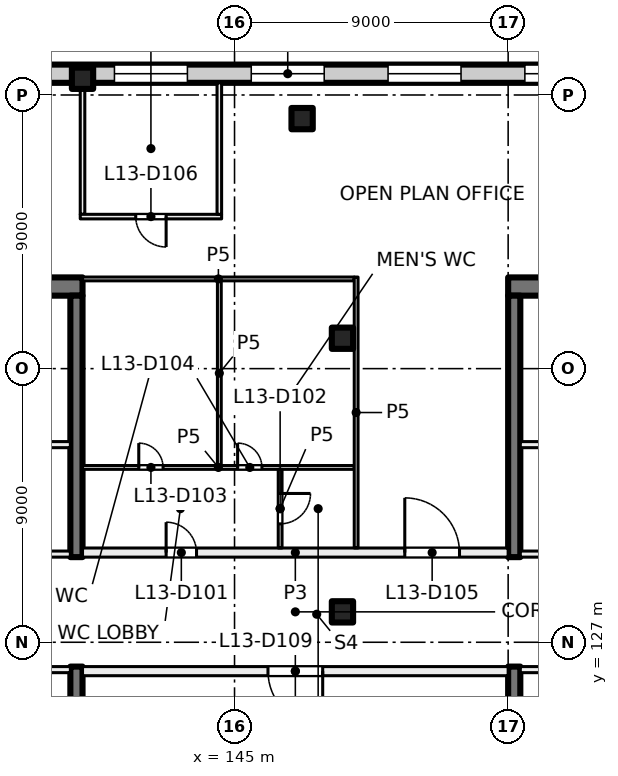
"""IFC4 building model, lengths in metres.
Left out: names, types, materials, properties, quantities, classifications, styles, units other than length and angle.
Written with IfcOpenShell. Run it as: python <this file> out.ifc"""

import sys

from ifc_helpers import new_model, si_unit, direction, frame, frame_2d, origin, origin_2d, place, context, subcontext, project, spatial, rectangle, extrude, element, fill, save


model = new_model("IFC4")
c1 = context("Model", 3, precision=1e-05, world=origin(), true_north=direction((0.0, 1.0)))
c2 = subcontext(c1, "Body", "Model", "MODEL_VIEW")
j1 = project(units=[si_unit("LENGTHUNIT", "METRE"), si_unit("PLANEANGLEUNIT", "RADIAN")], contexts=[c1])
p1 = place(None, origin())
s1 = spatial("IfcSite", under=j1, at=p1, CompositionType="ELEMENT")
p2 = place(p1, origin())
s2 = spatial("IfcBuilding", under=s1, at=p2, CompositionType="ELEMENT")
p3 = place(p2, frame((0.0, 0.0, 59.5)))
s3 = spatial("IfcBuildingStorey", under=s2, at=p3, CompositionType="ELEMENT", Elevation=59.5)
for number, where, z_axis, x_axis in (
    (1, (148.55, 128.0, 0.0), (0.0, 0.0, 1.0), (1.0, 0.0, 0.0)),
    (2, (148.55, 137.0, 0.0), (0.0, 0.0, 1.0), (1.0, 0.0, 0.0)),
    (3, (140.0, 145.55, 0.0), (0.0, 0.0, 1.0), (1.0, 0.0, 0.0)),
    (4, (147.223, 144.223, 0.0), (0.0, 0.0, 1.0), (1.0, 0.0, 0.0)),
):
    element("IfcColumn", number, at=place(p3, frame(where, z_axis=z_axis, x_axis=x_axis)), inside=s3, PredefinedType="COLUMN", context=c2, shape_type="SweptSolid", body=[
        extrude(rectangle(XDim=0.7, YDim=0.7, at=origin_2d()), origin(), (0.0, 0.0, 1.0), 4.0),
    ])
p4 = place(p3, frame((135.4, 138.7, 0.0), z_axis=(0.0, 0.0, 1.0), x_axis=(1.0, 0.0, 0.0)))
e5 = element("IfcWall", 5, at=p4, inside=s3, PredefinedType="SHEAR", context=c2, shape_type="SweptSolid", body=[
    extrude(rectangle(XDim=4.6, YDim=0.6, at=frame_2d((2.3, 0.0))), origin(), (0.0, 0.0, 1.0), 4.0),
])
for number, where, z_axis, x_axis in (
    (6, (139.8, 117.6, 0.0), (0.0, 0.0, 1.0), (0.0, 1.0, 0.0)),
    (7, (139.8, 129.8, 0.0), (0.0, 0.0, 1.0), (0.0, 1.0, 0.0)),
):
    element("IfcWall", number, at=place(p3, frame(where, z_axis=z_axis, x_axis=x_axis)), inside=s3, PredefinedType="SHEAR", context=c2, shape_type="SweptSolid", body=[
        extrude(rectangle(XDim=8.6, YDim=0.4, at=frame_2d((4.3, 0.0))), origin(), (0.0, 0.0, 1.0), 4.0),
    ])
p5 = place(p3, frame((158.6, 138.7, 0.0), z_axis=(0.0, 0.0, 1.0), x_axis=(-1.0, 0.0, 0.0)))
e8 = element("IfcWall", 8, at=p5, inside=s3, PredefinedType="SHEAR", context=c2, shape_type="SweptSolid", body=[
    extrude(rectangle(XDim=4.6, YDim=0.6, at=frame_2d((2.3, 0.0))), origin(), (0.0, 0.0, 1.0), 4.0),
])
for number, where, z_axis, x_axis in (
    (9, (154.2, 138.4, 0.0), (0.0, 0.0, 1.0), (0.0, -1.0, 0.0)),
    (10, (154.2, 126.2, 0.0), (0.0, 0.0, 1.0), (0.0, -1.0, 0.0)),
):
    element("IfcWall", number, at=place(p3, frame(where, z_axis=z_axis, x_axis=x_axis)), inside=s3, PredefinedType="SHEAR", context=c2, shape_type="SweptSolid", body=[
        extrude(rectangle(XDim=8.6, YDim=0.4, at=frame_2d((4.3, 0.0))), origin(), (0.0, 0.0, 1.0), 4.0),
    ])
p6 = place(p3, frame((131.07, 145.7, 0.0), z_axis=(0.0, 0.0, 1.0), x_axis=(1.0, 0.0, 0.0)))
e11 = element("IfcWall", 11, at=p6, inside=s3, PredefinedType="SOLIDWALL", context=c2, shape_type="SweptSolid", body=[
    extrude(rectangle(XDim=31.93, YDim=0.6, at=frame_2d((15.965, 0.0))), origin(), (0.0, 0.0, 1.0), 3.625),
])
p7 = place(p6, frame((0.98, 0.0, 0.9)))
e12 = element("IfcOpeningElement", 12, at=p7, cuts=e11, PredefinedType="OPENING", context=c2, shape_type="SweptSolid", body=[
    extrude(rectangle(XDim=2.4, YDim=2.4, at=frame_2d((1.2, 1.2))), frame((0.0, 0.31, 0.0), z_axis=(0.0, -1.0, 0.0), x_axis=(1.0, 0.0, 0.0)), (0.0, 0.0, 1.0), 0.62),
])
p8 = place(p6, frame((5.48, 0.0, 0.9)))
e13 = element("IfcOpeningElement", 13, at=p8, cuts=e11, PredefinedType="OPENING", context=c2, shape_type="SweptSolid", body=[
    extrude(rectangle(XDim=2.4, YDim=2.4, at=frame_2d((1.2, 1.2))), frame((0.0, 0.31, 0.0), z_axis=(0.0, -1.0, 0.0), x_axis=(1.0, 0.0, 0.0)), (0.0, 0.0, 1.0), 0.62),
])
p9 = place(p6, frame((9.98, 0.0, 0.9)))
e14 = element("IfcOpeningElement", 14, at=p9, cuts=e11, PredefinedType="OPENING", context=c2, shape_type="SweptSolid", body=[
    extrude(rectangle(XDim=2.4, YDim=2.4, at=frame_2d((1.2, 1.2))), frame((0.0, 0.31, 0.0), z_axis=(0.0, -1.0, 0.0), x_axis=(1.0, 0.0, 0.0)), (0.0, 0.0, 1.0), 0.62),
])
p10 = place(p6, frame((14.48, 0.0, 0.9)))
e15 = element("IfcOpeningElement", 15, at=p10, cuts=e11, PredefinedType="OPENING", context=c2, shape_type="SweptSolid", body=[
    extrude(rectangle(XDim=2.4, YDim=2.4, at=frame_2d((1.2, 1.2))), frame((0.0, 0.31, 0.0), z_axis=(0.0, -1.0, 0.0), x_axis=(1.0, 0.0, 0.0)), (0.0, 0.0, 1.0), 0.62),
])
p11 = place(p6, frame((18.98, 0.0, 0.9)))
e16 = element("IfcOpeningElement", 16, at=p11, cuts=e11, PredefinedType="OPENING", context=c2, shape_type="SweptSolid", body=[
    extrude(rectangle(XDim=2.4, YDim=2.4, at=frame_2d((1.2, 1.2))), frame((0.0, 0.31, 0.0), z_axis=(0.0, -1.0, 0.0), x_axis=(1.0, 0.0, 0.0)), (0.0, 0.0, 1.0), 0.62),
])
p12 = place(p6, frame((23.48, 0.0, 0.9)))
e17 = element("IfcOpeningElement", 17, at=p12, cuts=e11, PredefinedType="OPENING", context=c2, shape_type="SweptSolid", body=[
    extrude(rectangle(XDim=2.4, YDim=2.4, at=frame_2d((1.2, 1.2))), frame((0.0, 0.31, 0.0), z_axis=(0.0, -1.0, 0.0), x_axis=(1.0, 0.0, 0.0)), (0.0, 0.0, 1.0), 0.62),
])
p13 = place(p6, frame((27.98, 0.0, 0.9)))
e18 = element("IfcOpeningElement", 18, at=p13, cuts=e11, PredefinedType="OPENING", context=c2, shape_type="SweptSolid", body=[
    extrude(rectangle(XDim=2.4, YDim=2.4, at=frame_2d((1.2, 1.2))), frame((0.0, 0.31, 0.0), z_axis=(0.0, -1.0, 0.0), x_axis=(1.0, 0.0, 0.0)), (0.0, 0.0, 1.0), 0.62),
])
p14 = place(p3, frame((135.0, 129.9, 0.0), z_axis=(0.0, 0.0, 1.0), x_axis=(1.0, 0.0, 0.0)))
e19 = element("IfcWall", 19, at=p14, inside=s3, PredefinedType="PARTITIONING", context=c2, shape_type="SweptSolid", body=[
    extrude(rectangle(XDim=4.6, YDim=0.2, at=frame_2d((2.3, 0.0))), origin(), (0.0, 0.0, 1.0), 3.625),
])
p15 = place(p14, frame((1.7, 0.0, 0.0)))
e20 = element("IfcOpeningElement", 20, at=p15, cuts=e19, PredefinedType="OPENING", context=c2, shape_type="SweptSolid", body=[
    extrude(rectangle(XDim=1.2, YDim=2.1, at=frame_2d((0.6, 1.05))), frame((0.0, 0.11, 0.0), z_axis=(0.0, -1.0, 0.0), x_axis=(1.0, 0.0, 0.0)), (0.0, 0.0, 1.0), 0.22),
])
p16 = place(p3, frame((135.0, 133.5, 0.0), z_axis=(0.0, 0.0, 1.0), x_axis=(1.0, 0.0, 0.0)))
e21 = element("IfcWall", 21, at=p16, inside=s3, PredefinedType="PARTITIONING", context=c2, shape_type="SweptSolid", body=[
    extrude(rectangle(XDim=4.6, YDim=0.2, at=frame_2d((2.3, 0.0))), origin(), (0.0, 0.0, 1.0), 3.625),
])
p17 = place(p16, frame((1.75, 0.0, 0.0)))
e22 = element("IfcOpeningElement", 22, at=p17, cuts=e21, PredefinedType="OPENING", context=c2, shape_type="SweptSolid", body=[
    extrude(rectangle(XDim=1.5, YDim=2.1, at=frame_2d((0.75, 1.05))), frame((0.0, 0.11, 0.0), z_axis=(0.0, -1.0, 0.0), x_axis=(1.0, 0.0, 0.0)), (0.0, 0.0, 1.0), 0.22),
])
p18 = place(p3, frame((139.6, 126.1, 0.0), z_axis=(0.0, 0.0, 1.0), x_axis=(-1.0, 0.0, 0.0)))
e23 = element("IfcWall", 23, at=p18, inside=s3, PredefinedType="PARTITIONING", context=c2, shape_type="SweptSolid", body=[
    extrude(rectangle(XDim=4.6, YDim=0.2, at=frame_2d((2.3, 0.0))), origin(), (0.0, 0.0, 1.0), 3.625),
])
p19 = place(p18, frame((1.7, 0.0, 0.0)))
e24 = element("IfcOpeningElement", 24, at=p19, cuts=e23, PredefinedType="OPENING", context=c2, shape_type="SweptSolid", body=[
    extrude(rectangle(XDim=1.2, YDim=2.1, at=frame_2d((0.6, 1.05))), frame((0.0, 0.11, 0.0), z_axis=(0.0, -1.0, 0.0), x_axis=(1.0, 0.0, 0.0)), (0.0, 0.0, 1.0), 0.22),
])
p20 = place(p3, frame((163.8, 126.1, 0.0), z_axis=(0.0, 0.0, 1.0), x_axis=(-1.0, 0.0, 0.0)))
e25 = element("IfcWall", 25, at=p20, inside=s3, PredefinedType="PARTITIONING", context=c2, shape_type="SweptSolid", body=[
    extrude(rectangle(XDim=9.4, YDim=0.2, at=frame_2d((4.7, 0.0))), origin(), (0.0, 0.0, 1.0), 3.625),
])
p21 = place(p20, frame((4.1, 0.0, 0.0)))
e26 = element("IfcOpeningElement", 26, at=p21, cuts=e25, PredefinedType="OPENING", context=c2, shape_type="SweptSolid", body=[
    extrude(rectangle(XDim=1.2, YDim=2.1, at=frame_2d((0.6, 1.05))), frame((0.0, 0.11, 0.0), z_axis=(0.0, -1.0, 0.0), x_axis=(1.0, 0.0, 0.0)), (0.0, 0.0, 1.0), 0.22),
])
p22 = place(p3, frame((154.4, 129.9, 0.0), z_axis=(0.0, 0.0, 1.0), x_axis=(1.0, 0.0, 0.0)))
e27 = element("IfcWall", 27, at=p22, inside=s3, PredefinedType="PARTITIONING", context=c2, shape_type="SweptSolid", body=[
    extrude(rectangle(XDim=9.4, YDim=0.2, at=frame_2d((4.7, 0.0))), origin(), (0.0, 0.0, 1.0), 3.625),
])
p23 = place(p22, frame((4.1, 0.0, 0.0)))
e28 = element("IfcOpeningElement", 28, at=p23, cuts=e27, PredefinedType="OPENING", context=c2, shape_type="SweptSolid", body=[
    extrude(rectangle(XDim=1.2, YDim=2.1, at=frame_2d((0.6, 1.05))), frame((0.0, 0.11, 0.0), z_axis=(0.0, -1.0, 0.0), x_axis=(1.0, 0.0, 0.0)), (0.0, 0.0, 1.0), 0.22),
])
p24 = place(p3, frame((154.4, 133.5, 0.0), z_axis=(0.0, 0.0, 1.0), x_axis=(1.0, 0.0, 0.0)))
e29 = element("IfcWall", 29, at=p24, inside=s3, PredefinedType="PARTITIONING", context=c2, shape_type="SweptSolid", body=[
    extrude(rectangle(XDim=9.4, YDim=0.2, at=frame_2d((4.7, 0.0))), origin(), (0.0, 0.0, 1.0), 3.625),
])
p25 = place(p24, frame((1.35, 0.0, 0.0)))
e30 = element("IfcOpeningElement", 30, at=p25, cuts=e29, PredefinedType="OPENING", context=c2, shape_type="SweptSolid", body=[
    extrude(rectangle(XDim=1.5, YDim=2.1, at=frame_2d((0.75, 1.05))), frame((0.0, 0.11, 0.0), z_axis=(0.0, -1.0, 0.0), x_axis=(1.0, 0.0, 0.0)), (0.0, 0.0, 1.0), 0.22),
])
p26 = place(p3, frame((140.0, 129.95, 0.0), z_axis=(0.0, 0.0, 1.0), x_axis=(1.0, 0.0, 0.0)))
e31 = element("IfcWall", 31, at=p26, inside=s3, PredefinedType="PARTITIONING", context=c2, shape_type="SweptSolid", body=[
    extrude(rectangle(XDim=14.0, YDim=0.3, at=frame_2d((7.0, 0.0))), origin(), (0.0, 0.0, 1.0), 3.625),
])
p27 = place(p26, frame((2.75, 0.0, 0.0)))
e32 = element("IfcOpeningElement", 32, at=p27, cuts=e31, PredefinedType="OPENING", context=c2, shape_type="SweptSolid", body=[
    extrude(rectangle(XDim=1.0, YDim=2.1, at=frame_2d((0.5, 1.05))), frame((0.0, 0.16, 0.0), z_axis=(0.0, -1.0, 0.0), x_axis=(1.0, 0.0, 0.0)), (0.0, 0.0, 1.0), 0.32),
])
p28 = place(p26, frame((10.6, 0.0, 0.0)))
e33 = element("IfcOpeningElement", 33, at=p28, cuts=e31, PredefinedType="OPENING", context=c2, shape_type="SweptSolid", body=[
    extrude(rectangle(XDim=1.8, YDim=2.1, at=frame_2d((0.9, 1.05))), frame((0.0, 0.16, 0.0), z_axis=(0.0, -1.0, 0.0), x_axis=(1.0, 0.0, 0.0)), (0.0, 0.0, 1.0), 0.32),
])
p29 = place(p3, frame((140.0, 132.75, 0.0), z_axis=(0.0, 0.0, 1.0), x_axis=(1.0, 0.0, 0.0)))
e34 = element("IfcWall", 34, at=p29, inside=s3, PredefinedType="PARTITIONING", context=c2, shape_type="SweptSolid", body=[
    extrude(rectangle(XDim=8.938, YDim=0.125, at=frame_2d((4.469, 0.0))), origin(), (0.0, 0.0, 1.0), 3.625),
])
p30 = place(p29, frame((1.85, 0.0, 0.0)))
e35 = element("IfcOpeningElement", 35, at=p30, cuts=e34, PredefinedType="OPENING", context=c2, shape_type="SweptSolid", body=[
    extrude(rectangle(XDim=0.8, YDim=2.1, at=frame_2d((0.4, 1.05))), frame((0.0, 0.073, 0.0), z_axis=(0.0, -1.0, 0.0), x_axis=(1.0, 0.0, 0.0)), (0.0, 0.0, 1.0), 0.145),
])
p31 = place(p29, frame((5.102, 0.0, 0.0)))
e36 = element("IfcOpeningElement", 36, at=p31, cuts=e34, PredefinedType="OPENING", context=c2, shape_type="SweptSolid", body=[
    extrude(rectangle(XDim=0.8, YDim=2.1, at=frame_2d((0.4, 1.05))), frame((0.0, 0.073, 0.0), z_axis=(0.0, -1.0, 0.0), x_axis=(1.0, 0.0, 0.0)), (0.0, 0.0, 1.0), 0.145),
])
p32 = place(p3, frame((140.0, 138.95, 0.0), z_axis=(0.0, 0.0, 1.0), x_axis=(1.0, 0.0, 0.0)))
e37 = element("IfcWall", 37, at=p32, inside=s3, PredefinedType="PARTITIONING", context=c2, shape_type="SweptSolid", body=[
    extrude(rectangle(XDim=8.938, YDim=0.125, at=frame_2d((4.469, 0.0))), origin(), (0.0, 0.0, 1.0), 3.625),
])
p33 = place(p3, frame((140.0, 141.075, 0.0), z_axis=(0.0, 0.0, 1.0), x_axis=(0.0, 1.0, 0.0)))
e38 = element("IfcWall", 38, at=p33, inside=s3, PredefinedType="PARTITIONING", context=c2, shape_type="SweptSolid", body=[
    extrude(rectangle(XDim=4.325, YDim=0.15, at=frame_2d((2.163, 0.0))), origin(), (0.0, 0.0, 1.0), 3.625),
])
p34 = place(p3, frame((144.5, 132.812, 0.0), z_axis=(0.0, 0.0, 1.0), x_axis=(0.0, 1.0, 0.0)))
e39 = element("IfcWall", 39, at=p34, inside=s3, PredefinedType="PARTITIONING", context=c2, shape_type="SweptSolid", body=[
    extrude(rectangle(XDim=6.076, YDim=0.125, at=frame_2d((3.038, 0.0))), origin(), (0.0, 0.0, 1.0), 3.625),
])
p35 = place(p3, frame((144.575, 141.0, 0.0), z_axis=(0.0, 0.0, 1.0), x_axis=(-1.0, 0.0, 0.0)))
e40 = element("IfcWall", 40, at=p35, inside=s3, PredefinedType="PARTITIONING", context=c2, shape_type="SweptSolid", body=[
    extrude(rectangle(XDim=4.65, YDim=0.15, at=frame_2d((2.325, 0.0))), origin(), (0.0, 0.0, 1.0), 3.625),
])
p36 = place(p35, frame((1.825, 0.0, 0.0)))
e41 = element("IfcOpeningElement", 41, at=p36, cuts=e40, PredefinedType="OPENING", context=c2, shape_type="SweptSolid", body=[
    extrude(rectangle(XDim=1.0, YDim=2.1, at=frame_2d((0.5, 1.05))), frame((0.0, 0.085, 0.0), z_axis=(0.0, -1.0, 0.0), x_axis=(1.0, 0.0, 0.0)), (0.0, 0.0, 1.0), 0.17),
])
p37 = place(p3, frame((144.5, 145.4, 0.0), z_axis=(0.0, 0.0, 1.0), x_axis=(0.0, -1.0, 0.0)))
e42 = element("IfcWall", 42, at=p37, inside=s3, PredefinedType="PARTITIONING", context=c2, shape_type="SweptSolid", body=[
    extrude(rectangle(XDim=4.325, YDim=0.15, at=frame_2d((2.163, 0.0))), origin(), (0.0, 0.0, 1.0), 3.625),
])
p38 = place(p3, frame((146.5, 132.688, 0.0), z_axis=(0.0, 0.0, 1.0), x_axis=(0.0, -1.0, 0.0)))
e43 = element("IfcWall", 43, at=p38, inside=s3, PredefinedType="PARTITIONING", context=c2, shape_type="SweptSolid", body=[
    extrude(rectangle(XDim=2.588, YDim=0.125, at=frame_2d((1.294, 0.0))), origin(), (0.0, 0.0, 1.0), 3.625),
])
p39 = place(p38, frame((0.794, 0.0, 0.0)))
e44 = element("IfcOpeningElement", 44, at=p39, cuts=e43, PredefinedType="OPENING", context=c2, shape_type="SweptSolid", body=[
    extrude(rectangle(XDim=1.0, YDim=2.1, at=frame_2d((0.5, 1.05))), frame((0.0, 0.073, 0.0), z_axis=(0.0, -1.0, 0.0), x_axis=(1.0, 0.0, 0.0)), (0.0, 0.0, 1.0), 0.145),
])
p40 = place(p3, frame((149.0, 139.012, 0.0), z_axis=(0.0, 0.0, 1.0), x_axis=(0.0, -1.0, 0.0)))
e45 = element("IfcWall", 45, at=p40, inside=s3, PredefinedType="PARTITIONING", context=c2, shape_type="SweptSolid", body=[
    extrude(rectangle(XDim=8.912, YDim=0.125, at=frame_2d((4.456, 0.0))), origin(), (0.0, 0.0, 1.0), 3.625),
])
p41 = place(p3, frame((154.0, 126.05, 0.0), z_axis=(0.0, 0.0, 1.0), x_axis=(-1.0, 0.0, 0.0)))
e46 = element("IfcWall", 46, at=p41, inside=s3, PredefinedType="PARTITIONING", context=c2, shape_type="SweptSolid", body=[
    extrude(rectangle(XDim=14.0, YDim=0.3, at=frame_2d((7.0, 0.0))), origin(), (0.0, 0.0, 1.0), 3.625),
])
p42 = place(p41, frame((6.1, 0.0, 0.0)))
e47 = element("IfcOpeningElement", 47, at=p42, cuts=e46, PredefinedType="OPENING", context=c2, shape_type="SweptSolid", body=[
    extrude(rectangle(XDim=1.8, YDim=2.1, at=frame_2d((0.9, 1.05))), frame((0.0, 0.16, 0.0), z_axis=(0.0, -1.0, 0.0), x_axis=(1.0, 0.0, 0.0)), (0.0, 0.0, 1.0), 0.32),
])
p43 = place(p9, origin())
e48 = element("IfcWindow", 48, at=p43, inside=s3, PartitioningType="SINGLE_PANEL", PredefinedType="WINDOW", context=c2, shape_type="SweptSolid", body=[
    extrude(rectangle(XDim=2.4, YDim=2.4, at=frame_2d((1.2, 1.2))), frame((0.0, 0.03, 0.0), z_axis=(0.0, -1.0, 0.0), x_axis=(1.0, 0.0, 0.0)), (0.0, 0.0, 1.0), 0.06),
])
fill(e14, e48)
p44 = place(p10, origin())
e49 = element("IfcWindow", 49, at=p44, inside=s3, PartitioningType="SINGLE_PANEL", PredefinedType="WINDOW", context=c2, shape_type="SweptSolid", body=[
    extrude(rectangle(XDim=2.4, YDim=2.4, at=frame_2d((1.2, 1.2))), frame((0.0, 0.03, 0.0), z_axis=(0.0, -1.0, 0.0), x_axis=(1.0, 0.0, 0.0)), (0.0, 0.0, 1.0), 0.06),
])
fill(e15, e49)
p45 = place(p11, origin())
e50 = element("IfcWindow", 50, at=p45, inside=s3, PartitioningType="SINGLE_PANEL", PredefinedType="WINDOW", context=c2, shape_type="SweptSolid", body=[
    extrude(rectangle(XDim=2.4, YDim=2.4, at=frame_2d((1.2, 1.2))), frame((0.0, 0.03, 0.0), z_axis=(0.0, -1.0, 0.0), x_axis=(1.0, 0.0, 0.0)), (0.0, 0.0, 1.0), 0.06),
])
fill(e16, e50)
p46 = place(p12, origin())
e51 = element("IfcWindow", 51, at=p46, inside=s3, PartitioningType="SINGLE_PANEL", PredefinedType="WINDOW", context=c2, shape_type="SweptSolid", body=[
    extrude(rectangle(XDim=2.4, YDim=2.4, at=frame_2d((1.2, 1.2))), frame((0.0, 0.03, 0.0), z_axis=(0.0, -1.0, 0.0), x_axis=(1.0, 0.0, 0.0)), (0.0, 0.0, 1.0), 0.06),
])
fill(e17, e51)
p47 = place(p27, origin())
e52 = element("IfcDoor", 52, at=p47, inside=s3, OperationType="SINGLE_SWING_LEFT", PredefinedType="DOOR", context=c2, shape_type="SweptSolid", body=[
    extrude(rectangle(XDim=1.0, YDim=2.1, at=frame_2d((0.5, 1.05))), frame((0.0, 0.025, 0.0), z_axis=(0.0, -1.0, 0.0), x_axis=(1.0, 0.0, 0.0)), (0.0, 0.0, 1.0), 0.05),
])
fill(e32, e52)
p48 = place(p39, origin())
e53 = element("IfcDoor", 53, at=p48, inside=s3, OperationType="SINGLE_SWING_RIGHT", PredefinedType="DOOR", context=c2, shape_type="SweptSolid", body=[
    extrude(rectangle(XDim=1.0, YDim=2.1, at=frame_2d((0.5, 1.05))), frame((0.0, 0.025, 0.0), z_axis=(0.0, -1.0, 0.0), x_axis=(1.0, 0.0, 0.0)), (0.0, 0.0, 1.0), 0.05),
])
fill(e44, e53)
p49 = place(p30, origin())
e54 = element("IfcDoor", 54, at=p49, inside=s3, OperationType="SINGLE_SWING_LEFT", PredefinedType="DOOR", context=c2, shape_type="SweptSolid", body=[
    extrude(rectangle(XDim=0.8, YDim=2.1, at=frame_2d((0.4, 1.05))), frame((0.0, 0.025, 0.0), z_axis=(0.0, -1.0, 0.0), x_axis=(1.0, 0.0, 0.0)), (0.0, 0.0, 1.0), 0.05),
])
fill(e35, e54)
p50 = place(p31, origin())
e55 = element("IfcDoor", 55, at=p50, inside=s3, OperationType="SINGLE_SWING_LEFT", PredefinedType="DOOR", context=c2, shape_type="SweptSolid", body=[
    extrude(rectangle(XDim=0.8, YDim=2.1, at=frame_2d((0.4, 1.05))), frame((0.0, 0.025, 0.0), z_axis=(0.0, -1.0, 0.0), x_axis=(1.0, 0.0, 0.0)), (0.0, 0.0, 1.0), 0.05),
])
fill(e36, e55)
p51 = place(p28, origin())
e56 = element("IfcDoor", 56, at=p51, inside=s3, OperationType="DOUBLE_DOOR_SINGLE_SWING", PredefinedType="DOOR", context=c2, shape_type="SweptSolid", body=[
    extrude(rectangle(XDim=1.8, YDim=2.1, at=frame_2d((0.9, 1.05))), frame((0.0, 0.025, 0.0), z_axis=(0.0, -1.0, 0.0), x_axis=(1.0, 0.0, 0.0)), (0.0, 0.0, 1.0), 0.05),
])
fill(e33, e56)
p52 = place(p36, origin())
e57 = element("IfcDoor", 57, at=p52, inside=s3, OperationType="SINGLE_SWING_LEFT", PredefinedType="DOOR", context=c2, shape_type="SweptSolid", body=[
    extrude(rectangle(XDim=1.0, YDim=2.1, at=frame_2d((0.5, 1.05))), frame((0.0, 0.025, 0.0), z_axis=(0.0, -1.0, 0.0), x_axis=(1.0, 0.0, 0.0)), (0.0, 0.0, 1.0), 0.05),
])
fill(e41, e57)
p53 = place(p42, origin())
e58 = element("IfcDoor", 58, at=p53, inside=s3, OperationType="DOUBLE_DOOR_SINGLE_SWING", PredefinedType="DOOR", context=c2, shape_type="SweptSolid", body=[
    extrude(rectangle(XDim=1.8, YDim=2.1, at=frame_2d((0.9, 1.05))), frame((0.0, 0.025, 0.0), z_axis=(0.0, -1.0, 0.0), x_axis=(1.0, 0.0, 0.0)), (0.0, 0.0, 1.0), 0.05),
])
fill(e47, e58)
save(model, sys.argv[1])
